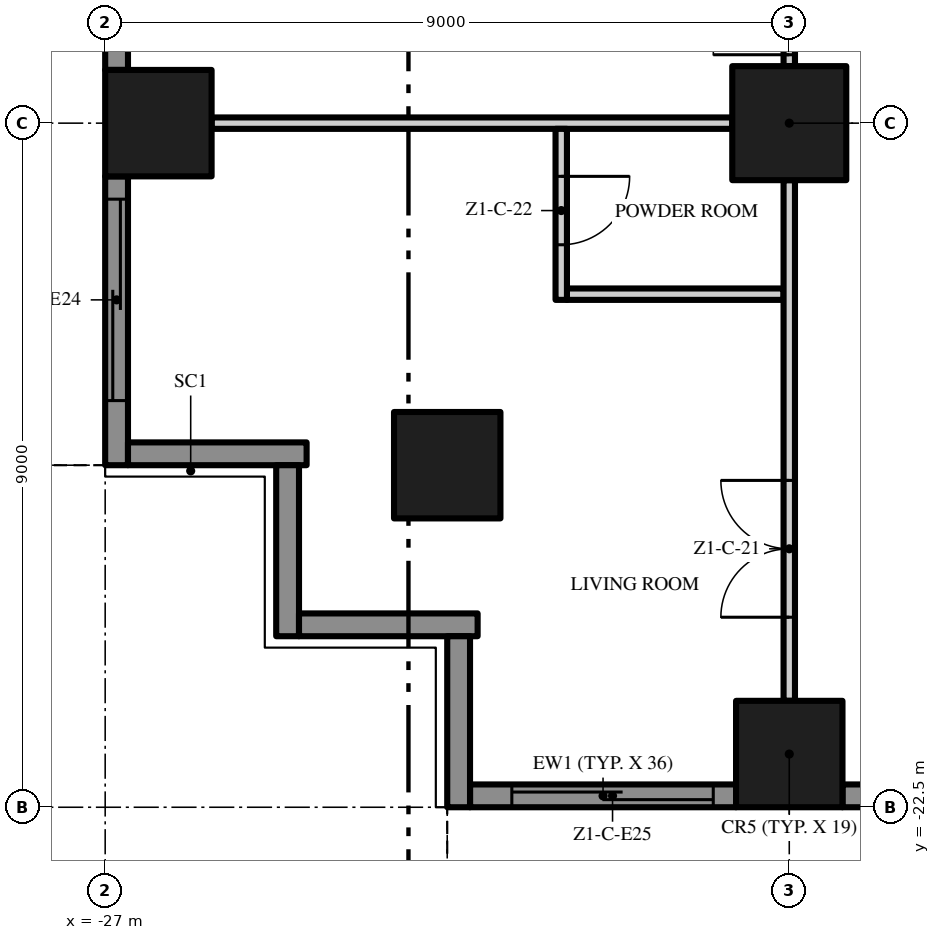
"""IFC4 building model, lengths in metres.
Left out: names, types, materials, properties, quantities, classifications, styles, units other than length and angle.
Written with IfcOpenShell. Run it as: python <this file> out.ifc"""

import sys

from ifc_helpers import new_model, si_unit, direction, frame, frame_2d, origin, origin_2d, place, context, subcontext, project, spatial, polyline, rectangle, outline, extrude, element, fill, save


model = new_model("IFC4")
c1 = context("Model", 3, precision=1e-05, world=origin(), true_north=direction((0.0, 1.0)))
c2 = subcontext(c1, "Body", "Model", "MODEL_VIEW")
j1 = project(units=[si_unit("LENGTHUNIT", "METRE"), si_unit("PLANEANGLEUNIT", "RADIAN")], contexts=[c1])
p1 = place(None, origin())
s1 = spatial("IfcSite", under=j1, at=p1, CompositionType="ELEMENT")
p2 = place(p1, origin())
s2 = spatial("IfcBuilding", under=s1, at=p2, CompositionType="ELEMENT")
p3 = place(p2, frame((0.0, 0.0, 45.4)))
s3 = spatial("IfcBuildingStorey", under=s2, at=p3, CompositionType="ELEMENT", Elevation=45.4)
p4 = place(p3, frame((-18.0, -13.5, 0.0), z_axis=(0.0, 0.0, 1.0), x_axis=(1.0, 0.0, 0.0)))
e1 = element("IfcColumn", 1, at=p4, inside=s3, PredefinedType="COLUMN", context=c2, shape_type="SweptSolid", body=[
    extrude(rectangle(XDim=1.5, YDim=1.5, at=origin_2d()), origin(), (0.0, 0.0, 1.0), 3.5),
])
for number, where, z_axis, x_axis in (
    (2, (-18.0, -21.8, 0.0), (0.0, 0.0, 1.0), (1.0, 0.0, 0.0)),
    (3, (-26.3, -13.5, 0.0), (0.0, 0.0, 1.0), (1.0, 0.0, 0.0)),
    (4, (-22.5, -18.0, 0.0), (0.0, 0.0, 1.0), (1.0, 0.0, 0.0)),
):
    element("IfcColumn", number, at=place(p3, frame(where, z_axis=z_axis, x_axis=x_axis)), inside=s3, PredefinedType="COLUMN", context=c2, shape_type="SweptSolid", body=[
        extrude(rectangle(XDim=1.4, YDim=1.4, at=origin_2d()), origin(), (0.0, 0.0, 1.0), 3.5),
    ])
p5 = place(p3, frame((-18.7, -22.35, 0.0), z_axis=(0.0, 0.0, 1.0), x_axis=(-1.0, 0.0, 0.0)))
e5 = element("IfcWall", 5, at=p5, inside=s3, PredefinedType="SOLIDWALL", context=c2, shape_type="SweptSolid", body=[
    extrude(rectangle(XDim=3.5, YDim=0.3, at=frame_2d((1.75, 0.0))), origin(), (0.0, 0.0, 1.0), 3.5),
])
p6 = place(p5, frame((0.3, 0.0, 0.0)))
e6 = element("IfcOpeningElement", 6, at=p6, cuts=e5, PredefinedType="OPENING", context=c2, shape_type="SweptSolid", body=[
    extrude(rectangle(XDim=2.65, YDim=2.4, at=frame_2d((1.325, 1.2))), frame((0.0, 0.16, 0.0), z_axis=(0.0, -1.0, 0.0), x_axis=(1.0, 0.0, 0.0)), (0.0, 0.0, 1.0), 0.32),
])
p7 = place(p3, frame((-9.7, -22.35, 0.0), z_axis=(0.0, 0.0, 1.0), x_axis=(-1.0, 0.0, 0.0)))
e7 = element("IfcWall", 7, at=p7, inside=s3, PredefinedType="SOLIDWALL", context=c2, shape_type="SweptSolid", body=[
    extrude(rectangle(XDim=7.6, YDim=0.3, at=frame_2d((3.8, 0.0))), origin(), (0.0, 0.0, 1.0), 3.5),
])
p8 = place(p7, frame((4.65, 0.0, 0.45)))
e8 = element("IfcOpeningElement", 8, at=p8, cuts=e7, PredefinedType="OPENING", context=c2, shape_type="SweptSolid", body=[
    extrude(rectangle(XDim=2.65, YDim=2.65, at=frame_2d((1.325, 1.325))), frame((0.0, 0.16, 0.0), z_axis=(0.0, -1.0, 0.0), x_axis=(1.0, 0.0, 0.0)), (0.0, 0.0, 1.0), 0.32),
])
p9 = place(p7, frame((0.3, 0.0, 0.45)))
e9 = element("IfcOpeningElement", 9, at=p9, cuts=e7, PredefinedType="OPENING", context=c2, shape_type="SweptSolid", body=[
    extrude(rectangle(XDim=2.65, YDim=2.65, at=frame_2d((1.325, 1.325))), frame((0.0, 0.16, 0.0), z_axis=(0.0, -1.0, 0.0), x_axis=(1.0, 0.0, 0.0)), (0.0, 0.0, 1.0), 0.32),
])
p10 = place(p3, frame((-26.85, -12.8, 0.0), z_axis=(0.0, 0.0, 1.0), x_axis=(0.0, 1.0, 0.0)))
e10 = element("IfcWall", 10, at=p10, inside=s3, PredefinedType="SOLIDWALL", context=c2, shape_type="SweptSolid", body=[
    extrude(rectangle(XDim=7.6, YDim=0.3, at=frame_2d((3.8, 0.0))), origin(), (0.0, 0.0, 1.0), 3.5),
])
p11 = place(p10, frame((4.65, 0.0, 0.45)))
e11 = element("IfcOpeningElement", 11, at=p11, cuts=e10, PredefinedType="OPENING", context=c2, shape_type="SweptSolid", body=[
    extrude(rectangle(XDim=2.65, YDim=2.65, at=frame_2d((1.325, 1.325))), frame((0.0, 0.16, 0.0), z_axis=(0.0, -1.0, 0.0), x_axis=(1.0, 0.0, 0.0)), (0.0, 0.0, 1.0), 0.32),
])
p12 = place(p10, frame((0.3, 0.0, 0.45)))
e12 = element("IfcOpeningElement", 12, at=p12, cuts=e10, PredefinedType="OPENING", context=c2, shape_type="SweptSolid", body=[
    extrude(rectangle(XDim=2.65, YDim=2.65, at=frame_2d((1.325, 1.325))), frame((0.0, 0.16, 0.0), z_axis=(0.0, -1.0, 0.0), x_axis=(1.0, 0.0, 0.0)), (0.0, 0.0, 1.0), 0.32),
])
p13 = place(p3, frame((-26.85, -18.0, 0.0), z_axis=(0.0, 0.0, 1.0), x_axis=(0.0, 1.0, 0.0)))
e13 = element("IfcWall", 13, at=p13, inside=s3, PredefinedType="SOLIDWALL", context=c2, shape_type="SweptSolid", body=[
    extrude(rectangle(XDim=3.8, YDim=0.3, at=frame_2d((1.9, 0.0))), origin(), (0.0, 0.0, 1.0), 3.5),
])
p14 = place(p13, frame((0.85, 0.0, 0.0)))
e14 = element("IfcOpeningElement", 14, at=p14, cuts=e13, PredefinedType="OPENING", context=c2, shape_type="SweptSolid", body=[
    extrude(rectangle(XDim=2.65, YDim=2.4, at=frame_2d((1.325, 1.2))), frame((0.0, 0.16, 0.0), z_axis=(0.0, -1.0, 0.0), x_axis=(1.0, 0.0, 0.0)), (0.0, 0.0, 1.0), 0.32),
])
p15 = place(p3, frame((-24.35, -17.85, 0.0), z_axis=(0.0, 0.0, 1.0), x_axis=(-1.0, 0.0, 0.0)))
e15 = element("IfcWall", 15, at=p15, inside=s3, PredefinedType="SOLIDWALL", context=c2, shape_type="SweptSolid", body=[
    extrude(rectangle(XDim=2.35, YDim=0.3, at=frame_2d((1.175, 0.0))), origin(), (0.0, 0.0, 1.0), 3.5),
])
p16 = place(p3, frame((-24.6, -20.25, 0.0), z_axis=(0.0, 0.0, 1.0), x_axis=(0.0, 1.0, 0.0)))
e16 = element("IfcWall", 16, at=p16, inside=s3, PredefinedType="SOLIDWALL", context=c2, shape_type="SweptSolid", body=[
    extrude(rectangle(XDim=2.25, YDim=0.3, at=frame_2d((1.125, 0.0))), origin(), (0.0, 0.0, 1.0), 3.5),
])
p17 = place(p3, frame((-22.1, -20.1, 0.0), z_axis=(0.0, 0.0, 1.0), x_axis=(-1.0, 0.0, 0.0)))
e17 = element("IfcWall", 17, at=p17, inside=s3, PredefinedType="SOLIDWALL", context=c2, shape_type="SweptSolid", body=[
    extrude(rectangle(XDim=2.35, YDim=0.3, at=frame_2d((1.175, 0.0))), origin(), (0.0, 0.0, 1.0), 3.5),
])
p18 = place(p3, frame((-22.35, -22.5, 0.0), z_axis=(0.0, 0.0, 1.0), x_axis=(0.0, 1.0, 0.0)))
e18 = element("IfcWall", 18, at=p18, inside=s3, PredefinedType="SOLIDWALL", context=c2, shape_type="SweptSolid", body=[
    extrude(rectangle(XDim=2.25, YDim=0.3, at=frame_2d((1.125, 0.0))), origin(), (0.0, 0.0, 1.0), 3.5),
])
p19 = place(p3, origin())
e19 = element("IfcWall", 19, at=p19, inside=s3, PredefinedType="USERDEFINED", context=c2, shape_type="SweptSolid", body=[
    extrude(outline(polyline([(-22.5, -24.3), (-21.0, -25.005), (-19.5, -25.441), (-18.75, -25.5), (-18.0, -25.441), (-16.5, -25.005), (-15.0, -24.3), (-13.5, -23.595), (-12.0, -23.159), (-11.25, -23.1), (-10.5, -23.159), (-9.0, -23.595), (-7.5, -24.3), (-6.0, -25.005), (-4.5, -25.441), (-3.75, -25.5), (-3.0, -25.441), (-1.5, -25.005), (0.0, -24.3), (1.5, -23.595), (3.0, -23.159), (3.75, -23.1), (4.5, -23.159), (6.0, -23.595), (7.5, -24.3), (9.0, -25.005), (10.5, -25.441), (11.25, -25.5), (12.0, -25.441), (13.5, -25.005), (15.0, -24.3), (16.5, -23.595), (18.0, -23.159), (18.75, -23.1), (19.5, -23.159), (21.0, -23.595), (22.5, -24.3), (22.606, -24.074), (21.089, -23.36), (19.545, -22.911), (18.75, -22.849), (17.955, -22.911), (16.411, -23.36), (14.894, -24.074), (13.411, -24.771), (11.955, -25.194), (11.25, -25.249), (10.545, -25.194), (9.089, -24.771), (7.606, -24.074), (6.089, -23.36), (4.545, -22.911), (3.75, -22.849), (2.955, -22.911), (1.411, -23.36), (-0.106, -24.074), (-1.589, -24.771), (-3.045, -25.194), (-3.75, -25.249), (-4.455, -25.194), (-5.911, -24.771), (-7.394, -24.074), (-8.911, -23.36), (-10.455, -22.911), (-11.25, -22.849), (-12.045, -22.911), (-13.589, -23.36), (-15.106, -24.074), (-16.589, -24.771), (-18.045, -25.194), (-18.75, -25.249), (-19.455, -25.194), (-20.911, -24.771), (-22.394, -24.074), (-22.5, -24.3)])), origin(), (0.0, 0.0, 1.0), 0.9),
])
p20 = place(p3, origin())
e20 = element("IfcWall", 20, at=p20, inside=s3, PredefinedType="USERDEFINED", context=c2, shape_type="SweptSolid", body=[
    extrude(outline(polyline([(-28.8, 18.0), (-29.505, 16.5), (-29.941, 15.0), (-30.0, 14.25), (-29.941, 13.5), (-29.505, 12.0), (-28.8, 10.5), (-28.095, 9.0), (-27.659, 7.5), (-27.6, 6.75), (-27.659, 6.0), (-28.095, 4.5), (-28.8, 3.0), (-29.505, 1.5), (-29.941, 0.0), (-30.0, -0.75), (-29.941, -1.5), (-29.505, -3.0), (-28.8, -4.5), (-28.095, -6.0), (-27.659, -7.5), (-27.6, -8.25), (-27.659, -9.0), (-28.095, -10.5), (-28.8, -12.0), (-29.505, -13.5), (-29.941, -15.0), (-30.0, -15.75), (-29.941, -16.5), (-29.505, -18.0), (-29.265, -17.93), (-29.694, -16.455), (-29.749, -15.75), (-29.694, -15.045), (-29.271, -13.589), (-28.574, -12.106), (-27.86, -10.589), (-27.411, -9.045), (-27.349, -8.25), (-27.411, -7.455), (-27.86, -5.911), (-28.574, -4.394), (-29.271, -2.911), (-29.694, -1.455), (-29.749, -0.75), (-29.694, -0.045), (-29.271, 1.411), (-28.574, 2.894), (-27.86, 4.411), (-27.411, 5.955), (-27.349, 6.75), (-27.411, 7.545), (-27.86, 9.089), (-28.574, 10.606), (-29.271, 12.089), (-29.694, 13.545), (-29.749, 14.25), (-29.694, 14.955), (-29.271, 16.411), (-28.574, 17.894), (-28.8, 18.0)])), origin(), (0.0, 0.0, 1.0), 0.9),
])
p21 = place(p3, frame((-20.925, -15.75, 0.0), z_axis=(0.0, 0.0, 1.0), x_axis=(1.0, 0.0, 0.0)))
e21 = element("IfcWall", 21, at=p21, inside=s3, PredefinedType="PARTITIONING", context=c2, shape_type="SweptSolid", body=[
    extrude(rectangle(XDim=2.85, YDim=0.15, at=frame_2d((1.425, 0.0))), origin(), (0.0, 0.0, 1.0), 3.5),
])
p22 = place(p3, frame((-25.6, -13.5, 0.0), z_axis=(0.0, 0.0, 1.0), x_axis=(1.0, 0.0, 0.0)))
e22 = element("IfcWall", 22, at=p22, inside=s3, PredefinedType="PARTITIONING", context=c2, shape_type="SweptSolid", body=[
    extrude(rectangle(XDim=6.85, YDim=0.15, at=frame_2d((3.425, 0.0))), origin(), (0.0, 0.0, 1.0), 3.5),
])
p23 = place(p3, frame((-21.0, -13.575, 0.0), z_axis=(0.0, 0.0, 1.0), x_axis=(0.0, -1.0, 0.0)))
e23 = element("IfcWall", 23, at=p23, inside=s3, PredefinedType="PARTITIONING", context=c2, shape_type="SweptSolid", body=[
    extrude(rectangle(XDim=2.25, YDim=0.15, at=frame_2d((1.125, 0.0))), origin(), (0.0, 0.0, 1.0), 3.5),
])
p24 = place(p23, frame((0.625, 0.0, 0.0)))
e24 = element("IfcOpeningElement", 24, at=p24, cuts=e23, PredefinedType="OPENING", context=c2, shape_type="SweptSolid", body=[
    extrude(rectangle(XDim=0.9, YDim=2.1, at=frame_2d((0.45, 1.05))), frame((0.0, 0.085, 0.0), z_axis=(0.0, -1.0, 0.0), x_axis=(1.0, 0.0, 0.0)), (0.0, 0.0, 1.0), 0.17),
])
p25 = place(p3, frame((-18.0, -21.1, 0.0), z_axis=(0.0, 0.0, 1.0), x_axis=(0.0, 1.0, 0.0)))
e25 = element("IfcWall", 25, at=p25, inside=s3, PredefinedType="PARTITIONING", context=c2, shape_type="SweptSolid", body=[
    extrude(rectangle(XDim=6.85, YDim=0.15, at=frame_2d((3.425, 0.0))), origin(), (0.0, 0.0, 1.0), 3.5),
])
p26 = place(p25, frame((1.1, 0.0, 0.0)))
e26 = element("IfcOpeningElement", 26, at=p26, cuts=e25, PredefinedType="OPENING", context=c2, shape_type="SweptSolid", body=[
    extrude(rectangle(XDim=1.8, YDim=2.4, at=frame_2d((0.9, 1.2))), frame((0.0, 0.085, 0.0), z_axis=(0.0, -1.0, 0.0), x_axis=(1.0, 0.0, 0.0)), (0.0, 0.0, 1.0), 0.17),
])
p27 = place(p3, frame((-18.0, -12.75, 0.0), z_axis=(0.0, 0.0, 1.0), x_axis=(0.0, 1.0, 0.0)))
e27 = element("IfcWall", 27, at=p27, inside=s3, PredefinedType="PARTITIONING", context=c2, shape_type="SweptSolid", body=[
    extrude(rectangle(XDim=7.5, YDim=0.15, at=frame_2d((3.75, 0.0))), origin(), (0.0, 0.0, 1.0), 3.5),
])
p28 = place(p27, frame((0.15, 0.0, 0.0)))
e28 = element("IfcOpeningElement", 28, at=p28, cuts=e27, PredefinedType="OPENING", context=c2, shape_type="SweptSolid", body=[
    extrude(rectangle(XDim=1.0, YDim=2.4, at=frame_2d((0.5, 1.2))), frame((0.0, 0.085, 0.0), z_axis=(0.0, -1.0, 0.0), x_axis=(1.0, 0.0, 0.0)), (0.0, 0.0, 1.0), 0.17),
])
p29 = place(p27, frame((6.35, 0.0, 0.0)))
e29 = element("IfcOpeningElement", 29, at=p29, cuts=e27, PredefinedType="OPENING", context=c2, shape_type="SweptSolid", body=[
    extrude(rectangle(XDim=1.0, YDim=2.4, at=frame_2d((0.5, 1.2))), frame((0.0, 0.085, 0.0), z_axis=(0.0, -1.0, 0.0), x_axis=(1.0, 0.0, 0.0)), (0.0, 0.0, 1.0), 0.17),
])
p30 = place(p6, origin())
e30 = element("IfcDoor", 30, at=p30, inside=s3, OperationType="SINGLE_SWING_LEFT", PredefinedType="DOOR", context=c2, shape_type="SweptSolid", body=[
    extrude(rectangle(XDim=2.65, YDim=2.4, at=frame_2d((1.325, 1.2))), frame((0.0, 0.025, 0.0), z_axis=(0.0, -1.0, 0.0), x_axis=(1.0, 0.0, 0.0)), (0.0, 0.0, 1.0), 0.05),
])
fill(e6, e30)
p31 = place(p14, origin())
e31 = element("IfcDoor", 31, at=p31, inside=s3, OperationType="SINGLE_SWING_LEFT", PredefinedType="DOOR", context=c2, shape_type="SweptSolid", body=[
    extrude(rectangle(XDim=2.65, YDim=2.4, at=frame_2d((1.325, 1.2))), frame((0.0, 0.025, 0.0), z_axis=(0.0, -1.0, 0.0), x_axis=(1.0, 0.0, 0.0)), (0.0, 0.0, 1.0), 0.05),
])
fill(e14, e31)
p32 = place(p26, origin())
e32 = element("IfcDoor", 32, at=p32, inside=s3, OperationType="DOUBLE_DOOR_SINGLE_SWING", PredefinedType="DOOR", context=c2, shape_type="SweptSolid", body=[
    extrude(rectangle(XDim=1.8, YDim=2.4, at=frame_2d((0.9, 1.2))), frame((0.0, 0.025, 0.0), z_axis=(0.0, -1.0, 0.0), x_axis=(1.0, 0.0, 0.0)), (0.0, 0.0, 1.0), 0.05),
])
fill(e26, e32)
p33 = place(p24, origin())
e33 = element("IfcDoor", 33, at=p33, inside=s3, OperationType="SINGLE_SWING_LEFT", PredefinedType="DOOR", context=c2, shape_type="SweptSolid", body=[
    extrude(rectangle(XDim=0.9, YDim=2.1, at=frame_2d((0.45, 1.05))), frame((0.0, 0.025, 0.0), z_axis=(0.0, -1.0, 0.0), x_axis=(1.0, 0.0, 0.0)), (0.0, 0.0, 1.0), 0.05),
])
fill(e24, e33)
p34 = place(p28, origin())
e34 = element("IfcDoor", 34, at=p34, inside=s3, OperationType="SINGLE_SWING_LEFT", PredefinedType="DOOR", context=c2, shape_type="SweptSolid", body=[
    extrude(rectangle(XDim=1.0, YDim=2.4, at=frame_2d((0.5, 1.2))), frame((0.0, 0.025, 0.0), z_axis=(0.0, -1.0, 0.0), x_axis=(1.0, 0.0, 0.0)), (0.0, 0.0, 1.0), 0.05),
])
fill(e28, e34)
save(model, sys.argv[1])
